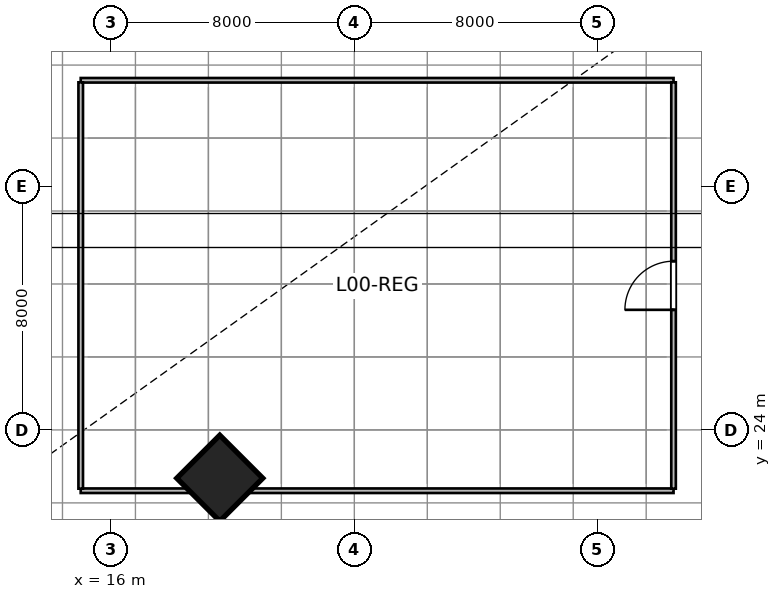
"""IFC4 building model, lengths in metres.
Left out: names, types, materials, properties, quantities, classifications, styles, units other than length and angle.
Written with IfcOpenShell. Run it as: python <this file> out.ifc"""

import sys

from ifc_helpers import new_model, si_unit, direction, frame, frame_2d, origin, origin_2d, place, context, subcontext, project, spatial, rectangle, extrude, source, transform, mapped, element, fill, save


model = new_model("IFC4")
c1 = context("Model", 3, precision=1e-05, world=origin(), true_north=direction((0.0, 1.0)))
c2 = subcontext(c1, "Body", "Model", "MODEL_VIEW")
j1 = project(units=[si_unit("LENGTHUNIT", "METRE"), si_unit("PLANEANGLEUNIT", "RADIAN")], contexts=[c1])
p1 = place(None, origin())
s1 = spatial("IfcSite", under=j1, at=p1, CompositionType="ELEMENT")
p2 = place(p1, origin())
s2 = spatial("IfcBuilding", under=s1, at=p2, CompositionType="ELEMENT")
p3 = place(p2, origin())
s3 = spatial("IfcBuildingStorey", under=s2, at=p3, CompositionType="ELEMENT", Elevation=0.0)
m1 = source(origin(), c2, "Body", "SweptSolid", [
    extrude(rectangle(XDim=2.0, YDim=2.0, at=origin_2d()), origin(), (0.0, 0.0, 1.0), 6.0),
])
p4 = place(p3, frame((19.574, 22.412, 0.0), z_axis=(0.0, 0.0, 1.0), x_axis=(-0.707106781187, -0.707106781187, 0.0)))
e1 = element("IfcColumn", 1, at=p4, inside=s3, PredefinedType="COLUMN", context=c2, shape_type="MappedRepresentation", body=[
    mapped(m1, transform((0.0, 0.0, 0.0), scale=1.0)),
])
m2 = source(origin(), c2, "Body", "SweptSolid", [
    extrude(rectangle(XDim=4.535, YDim=0.35, at=frame_2d((2.268, 0.0))), origin(), (0.0, 0.0, 1.0), 5.7),
])
p5 = place(p3, frame((15.827, 18.881, 0.0), z_axis=(0.0, 0.0, 1.0), x_axis=(-0.86528620064, 0.501278157295, 0.0)))
e2 = element("IfcWall", 2, at=p5, inside=s3, PredefinedType="SOLIDWALL", context=c2, shape_type="MappedRepresentation", body=[
    mapped(m2, transform((0.0, 0.0, 0.0), scale=1.0)),
])
m3 = source(origin(), c2, "Body", "SweptSolid", [
    extrude(rectangle(XDim=19.5, YDim=0.15, at=frame_2d((9.75, 0.0))), origin(), (0.0, 0.0, 1.0), 4.761),
])
p6 = place(p3, frame((15.0, 22.0, 0.0), z_axis=(0.0, 0.0, 1.0), x_axis=(1.0, 0.0, 0.0)))
e3 = element("IfcWall", 3, at=p6, inside=s3, PredefinedType="PARTITIONING", context=c2, shape_type="MappedRepresentation", body=[
    mapped(m3, transform((0.0, 0.0, 0.0), scale=1.0)),
])
m4 = source(origin(), c2, "Body", "SweptSolid", [
    extrude(rectangle(XDim=19.5, YDim=0.15, at=frame_2d((9.75, 0.0))), origin(), (0.0, 0.0, 1.0), 5.7),
])
p7 = place(p3, frame((15.0, 35.5, 0.0), z_axis=(0.0, 0.0, 1.0), x_axis=(1.0, 0.0, 0.0)))
e4 = element("IfcWall", 4, at=p7, inside=s3, PredefinedType="PARTITIONING", context=c2, shape_type="MappedRepresentation", body=[
    mapped(m4, transform((0.0, 0.0, 0.0), scale=1.0)),
])
m5 = source(origin(), c2, "Body", "SweptSolid", [
    extrude(rectangle(XDim=13.365, YDim=0.15, at=frame_2d((6.683, 0.0))), origin(), (0.0, 0.0, 1.0), 5.7),
])
p8 = place(p3, frame((15.0, 22.067, 0.0), z_axis=(0.0, 0.0, 1.0), x_axis=(0.0, 1.0, 0.0)))
e5 = element("IfcWall", 5, at=p8, inside=s3, PredefinedType="PARTITIONING", context=c2, shape_type="MappedRepresentation", body=[
    mapped(m5, transform((0.0, 0.0, 0.0), scale=1.0)),
])
p9 = place(p3, frame((34.5, 22.067, 0.0), z_axis=(0.0, 0.0, 1.0), x_axis=(0.0, 1.0, 0.0)))
e6 = element("IfcWall", 6, at=p9, inside=s3, PredefinedType="PARTITIONING", context=c2, shape_type="MappedRepresentation", body=[
    mapped(m5, transform((0.0, 0.0, 0.0), scale=1.0)),
])
p10 = place(p9, frame((5.883, 0.0, 0.0)))
e7 = element("IfcOpeningElement", 7, at=p10, cuts=e6, PredefinedType="OPENING", context=c2, shape_type="SweptSolid", body=[
    extrude(rectangle(XDim=1.6, YDim=2.15, at=frame_2d((0.8, 1.075))), frame((0.0, 0.085, 0.0), z_axis=(0.0, -1.0, 0.0), x_axis=(1.0, 0.0, 0.0)), (0.0, 0.0, 1.0), 0.17),
])
m6 = source(origin(), c2, "Body", "SweptSolid", [
    extrude(rectangle(XDim=1.6, YDim=2.15, at=frame_2d((0.8, 1.075))), frame((0.0, 0.025, 0.0), z_axis=(0.0, -1.0, 0.0), x_axis=(1.0, 0.0, 0.0)), (0.0, 0.0, 1.0), 0.05),
])
p11 = place(p10, origin())
e8 = element("IfcDoor", 8, at=p11, inside=s3, OperationType="SINGLE_SWING_LEFT", PredefinedType="DOOR", context=c2, shape_type="MappedRepresentation", body=[
    mapped(m6, transform((0.0, 0.0, 0.0), scale=1.0)),
])
fill(e7, e8)
save(model, sys.argv[1])
